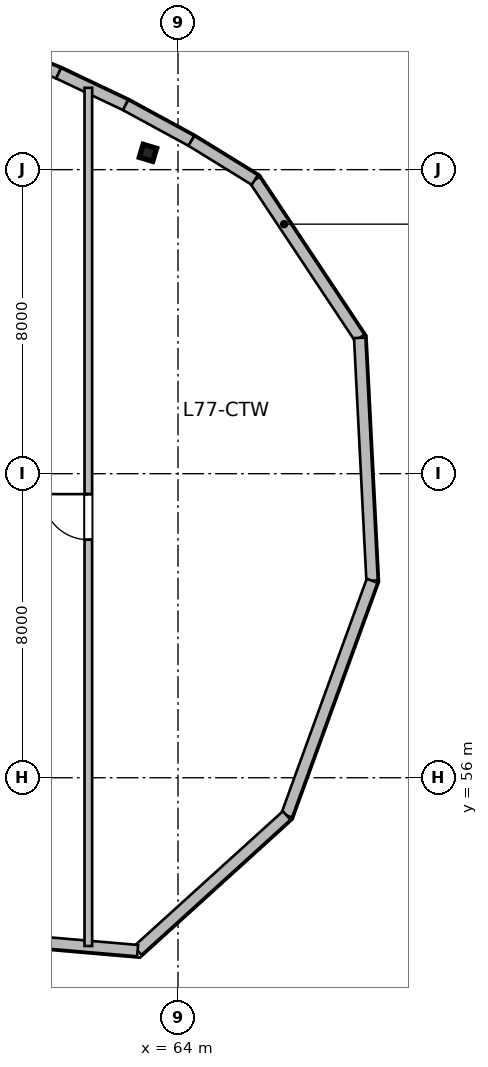
"""IFC4 building model, lengths in metres.
Left out: names, types, materials, properties, quantities, classifications, styles, units other than length and angle.
Written with IfcOpenShell. Run it as: python <this file> out.ifc"""

import sys

from ifc_helpers import new_model, si_unit, direction, frame, frame_2d, origin, origin_2d, place, context, subcontext, project, spatial, rectangle, i_section, extrude, source, transform, mapped, element, fill, save


model = new_model("IFC4")
c1 = context("Model", 3, precision=1e-05, world=origin(), true_north=direction((0.0, 1.0)))
c2 = subcontext(c1, "Body", "Model", "MODEL_VIEW")
j1 = project(units=[si_unit("LENGTHUNIT", "METRE"), si_unit("PLANEANGLEUNIT", "RADIAN")], contexts=[c1])
p1 = place(None, origin())
s1 = spatial("IfcSite", under=j1, at=p1, CompositionType="ELEMENT")
p2 = place(p1, origin())
s2 = spatial("IfcBuilding", under=s1, at=p2, CompositionType="ELEMENT")
p3 = place(p2, frame((0.0, 0.0, 318.0)))
s3 = spatial("IfcBuildingStorey", under=s2, at=p3, CompositionType="ELEMENT", Elevation=318.0)
m1 = source(origin(), c2, "Body", "SweptSolid", [
    extrude(i_section(OverallWidth=0.369, OverallDepth=0.356, WebThickness=0.011, FlangeThickness=0.018, at=origin_2d()), origin(), (0.0, 0.0, 1.0), 5.4),
])
p4 = place(p3, frame((63.209, 72.442, 0.0), z_axis=(0.0, 0.0, 1.0), x_axis=(0.288697611798, 0.957420330337, 0.0)))
e1 = element("IfcColumn", 1, at=p4, inside=s3, PredefinedType="COLUMN", context=c2, shape_type="MappedRepresentation", body=[
    mapped(m1, transform((0.0, 0.0, 0.0), scale=1.0)),
])
m2 = source(origin(), c2, "Body", "SweptSolid", [
    extrude(rectangle(XDim=4.988, YDim=0.3, at=frame_2d((2.494, 0.0))), origin(), (0.0, 0.0, 1.0), 5.12),
])
p5 = place(p3, frame((66.021, 71.729, 0.0), z_axis=(0.0, 0.0, 1.0), x_axis=(0.553468328856, -0.832870223356, 0.0)))
e2 = element("IfcWall", 2, at=p5, inside=s3, PredefinedType="SOLIDWALL", context=c2, shape_type="MappedRepresentation", body=[
    mapped(m2, transform((0.0, 0.0, 0.0), scale=1.0)),
])
m3 = source(origin(), c2, "Body", "SweptSolid", [
    extrude(rectangle(XDim=6.4, YDim=0.3, at=frame_2d((3.2, 0.0))), origin(), (0.0, 0.0, 1.0), 5.12),
])
p6 = place(p3, frame((68.781, 67.575, 0.0), z_axis=(0.0, 0.0, 1.0), x_axis=(0.050888906156, -0.998704320222, 0.0)))
e3 = element("IfcWall", 3, at=p6, inside=s3, PredefinedType="SOLIDWALL", context=c2, shape_type="MappedRepresentation", body=[
    mapped(m3, transform((0.0, 0.0, 0.0), scale=1.0)),
])
m4 = source(origin(), c2, "Body", "SweptSolid", [
    extrude(rectangle(XDim=6.573, YDim=0.3, at=frame_2d((3.287, 0.0))), origin(), (0.0, 0.0, 1.0), 5.12),
])
p7 = place(p3, frame((69.107, 61.183, 0.0), z_axis=(0.0, 0.0, 1.0), x_axis=(-0.342017422465, -0.939693611094, 0.0)))
e4 = element("IfcWall", 4, at=p7, inside=s3, PredefinedType="SOLIDWALL", context=c2, shape_type="MappedRepresentation", body=[
    mapped(m4, transform((0.0, 0.0, 0.0), scale=1.0)),
])
m5 = source(origin(), c2, "Body", "SweptSolid", [
    extrude(rectangle(XDim=5.294, YDim=0.3, at=frame_2d((2.647, 0.0))), origin(), (0.0, 0.0, 1.0), 5.12),
])
p8 = place(p3, frame((66.859, 55.007, 0.0), z_axis=(0.0, 0.0, 1.0), x_axis=(-0.740695017527, -0.671841418052, 0.0)))
e5 = element("IfcWall", 5, at=p8, inside=s3, PredefinedType="SOLIDWALL", context=c2, shape_type="MappedRepresentation", body=[
    mapped(m5, transform((0.0, 0.0, 0.0), scale=1.0)),
])
m6 = source(origin(), c2, "Body", "SweptSolid", [
    extrude(rectangle(XDim=4.111, YDim=0.3, at=frame_2d((2.055, 0.0))), origin(), (0.0, 0.0, 1.0), 5.12),
])
p9 = place(p3, frame((62.938, 51.45, 0.0), z_axis=(0.0, 0.0, 1.0), x_axis=(-0.996300298771, 0.085940180764, 0.0)))
e6 = element("IfcWall", 6, at=p9, inside=s3, PredefinedType="SOLIDWALL", context=c2, shape_type="MappedRepresentation", body=[
    mapped(m6, transform((0.0, 0.0, 0.0), scale=1.0)),
])
m7 = source(origin(), c2, "Body", "SweptSolid", [
    extrude(rectangle(XDim=1.93, YDim=0.3, at=frame_2d((0.965, 0.0))), origin(), (0.0, 0.0, 1.0), 5.12),
])
p10 = place(p3, frame((59.07, 75.264, 0.0), z_axis=(0.0, 0.0, 1.0), x_axis=(0.926200349129, -0.377031713882, 0.0)))
e7 = element("IfcWall", 7, at=p10, inside=s3, PredefinedType="SOLIDWALL", context=c2, shape_type="MappedRepresentation", body=[
    mapped(m7, transform((0.0, 0.0, 0.0), scale=1.0)),
])
m8 = source(origin(), c2, "Body", "SweptSolid", [
    extrude(rectangle(XDim=1.95, YDim=0.3, at=frame_2d((0.975, 0.0))), origin(), (0.0, 0.0, 1.0), 5.12),
])
p11 = place(p3, frame((60.858, 74.536, 0.0), z_axis=(0.0, 0.0, 1.0), x_axis=(0.903429098402, -0.428737523621, 0.0)))
e8 = element("IfcWall", 8, at=p11, inside=s3, PredefinedType="SOLIDWALL", context=c2, shape_type="MappedRepresentation", body=[
    mapped(m8, transform((0.0, 0.0, 0.0), scale=1.0)),
])
m9 = source(origin(), c2, "Body", "SweptSolid", [
    extrude(rectangle(XDim=1.972, YDim=0.3, at=frame_2d((0.986, 0.0))), origin(), (0.0, 0.0, 1.0), 5.12),
])
p12 = place(p3, frame((62.62, 73.7, 0.0), z_axis=(0.0, 0.0, 1.0), x_axis=(0.878387239208, -0.477949639603, 0.0)))
e9 = element("IfcWall", 9, at=p12, inside=s3, PredefinedType="SOLIDWALL", context=c2, shape_type="MappedRepresentation", body=[
    mapped(m9, transform((0.0, 0.0, 0.0), scale=1.0)),
])
m10 = source(origin(), c2, "Body", "SweptSolid", [
    extrude(rectangle(XDim=1.96, YDim=0.3, at=frame_2d((0.98, 0.0))), origin(), (0.0, 0.0, 1.0), 5.12),
])
p13 = place(p3, frame((64.352, 72.758, 0.0), z_axis=(0.0, 0.0, 1.0), x_axis=(0.85131178833, -0.524660117647, 0.0)))
e10 = element("IfcWall", 10, at=p13, inside=s3, PredefinedType="SOLIDWALL", context=c2, shape_type="MappedRepresentation", body=[
    mapped(m10, transform((0.0, 0.0, 0.0), scale=1.0)),
])
m11 = source(origin(), c2, "Body", "SweptSolid", [
    extrude(rectangle(XDim=22.582, YDim=0.2, at=frame_2d((11.291, 0.0))), origin(), (0.0, 0.0, 1.0), 5.12),
])
p14 = place(p3, frame((61.64, 51.572, 0.0), z_axis=(0.0, 0.0, 1.0), x_axis=(0.0, 1.0, 0.0)))
e11 = element("IfcWall", 11, at=p14, inside=s3, PredefinedType="SOLIDWALL", context=c2, shape_type="MappedRepresentation", body=[
    mapped(m11, transform((0.0, 0.0, 0.0), scale=1.0)),
])
p15 = place(p14, frame((10.691, 0.0, 0.0)))
e12 = element("IfcOpeningElement", 12, at=p15, cuts=e11, PredefinedType="OPENING", context=c2, shape_type="SweptSolid", body=[
    extrude(rectangle(XDim=1.2, YDim=2.15, at=frame_2d((0.6, 1.075))), frame((0.0, 0.11, 0.0), z_axis=(0.0, -1.0, 0.0), x_axis=(1.0, 0.0, 0.0)), (0.0, 0.0, 1.0), 0.22),
])
m12 = source(origin(), c2, "Body", "SweptSolid", [
    extrude(rectangle(XDim=1.2, YDim=2.15, at=frame_2d((0.6, 1.075))), frame((0.0, 0.025, 0.0), z_axis=(0.0, -1.0, 0.0), x_axis=(1.0, 0.0, 0.0)), (0.0, 0.0, 1.0), 0.05),
])
p16 = place(p15, origin())
e13 = element("IfcDoor", 13, at=p16, inside=s3, OperationType="SINGLE_SWING_RIGHT", PredefinedType="DOOR", context=c2, shape_type="MappedRepresentation", body=[
    mapped(m12, transform((0.0, 0.0, 0.0), scale=1.0)),
])
fill(e12, e13)
save(model, sys.argv[1])
